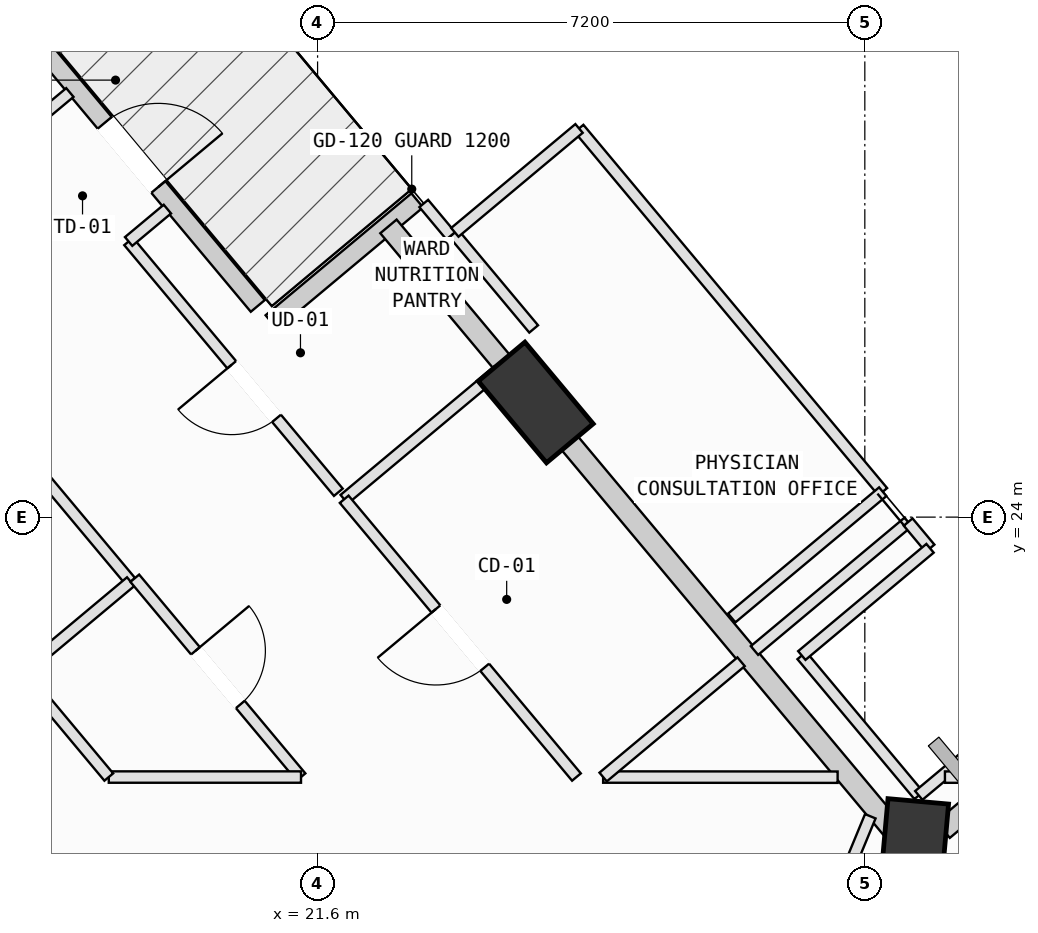
"""IFC4 building model, lengths in metres.
Left out: names, types, materials, properties, quantities, classifications, styles, units other than length and angle.
Written with IfcOpenShell. Run it as: python <this file> out.ifc"""

import sys

from ifc_helpers import new_model, si_unit, direction, frame, frame_2d, origin, origin_2d, place, context, subcontext, project, spatial, rectangle, extrude, element, fill, save


model = new_model("IFC4")
c1 = context("Model", 3, precision=1e-05, world=origin(), true_north=direction((0.0, 1.0)))
c2 = subcontext(c1, "Body", "Model", "MODEL_VIEW")
j1 = project(units=[si_unit("LENGTHUNIT", "METRE"), si_unit("PLANEANGLEUNIT", "RADIAN")], contexts=[c1])
p1 = place(None, origin())
s1 = spatial("IfcSite", under=j1, at=p1, CompositionType="ELEMENT")
p2 = place(p1, origin())
s2 = spatial("IfcBuilding", under=s1, at=p2, CompositionType="ELEMENT")
p3 = place(p2, frame((0.0, 0.0, 193.8)))
s3 = spatial("IfcBuildingStorey", under=s2, at=p3, CompositionType="ELEMENT", Elevation=193.8)
p4 = place(p3, frame((29.441, 19.563, 0.002), z_axis=(0.021801167922, -0.017037887535, 0.999617136441), x_axis=(-0.729765502986, 0.68314184463, 0.027559585755)))
e1 = element("IfcColumn", 1, at=p4, inside=s3, PredefinedType="COLUMN", context=c2, shape_type="SweptSolid", body=[
    extrude(rectangle(XDim=1.4, YDim=0.8, at=origin_2d()), origin(), (0.0, 0.0, 1.0), 3.998),
])
p5 = place(p3, frame((24.47, 25.508, 0.002), z_axis=(-0.00262502539, -0.037849203304, 0.999280014336), x_axis=(-0.586871563846, 0.809156714425, 0.029106340381)))
e2 = element("IfcColumn", 2, at=p5, inside=s3, PredefinedType="COLUMN", context=c2, shape_type="SweptSolid", body=[
    extrude(rectangle(XDim=1.4, YDim=0.8, at=origin_2d()), origin(), (0.0, 0.0, 1.0), 3.999),
])
p6 = place(p3, frame((19.851, 31.032, 0.002), z_axis=(-0.025303350166, -0.057069724712, 0.998049491254), x_axis=(-0.276053399892, 0.959948355604, 0.047892326953)))
e3 = element("IfcColumn", 3, at=p6, inside=s3, PredefinedType="COLUMN", context=c2, shape_type="SweptSolid", body=[
    extrude(rectangle(XDim=1.4, YDim=0.8, at=origin_2d()), origin(), (0.0, 0.0, 1.0), 4.004),
])
p7 = place(p3, frame((16.349, 32.118, 0.0), z_axis=(0.0, 0.0, 1.0), x_axis=(0.64142910076, -0.767182317769, 0.0)))
e4 = element("IfcWall", 4, at=p7, inside=s3, PredefinedType="SOLIDWALL", context=c2, shape_type="SweptSolid", body=[
    extrude(rectangle(XDim=6.96, YDim=0.24, at=frame_2d((3.48, 0.0))), origin(), (0.0, 0.0, 1.0), 3.265),
])
p8 = place(p7, frame((3.82, 0.0, 0.0)))
e5 = element("IfcOpeningElement", 5, at=p8, cuts=e4, PredefinedType="OPENING", context=c2, shape_type="SweptSolid", body=[
    extrude(rectangle(XDim=1.1, YDim=2.15, at=frame_2d((0.55, 1.075))), frame((0.0, 0.13, 0.0), z_axis=(0.0, -1.0, 0.0), x_axis=(1.0, 0.0, 0.0)), (0.0, 0.0, 1.0), 0.26),
])
p9 = place(p3, frame((20.993, 26.564, 0.0), z_axis=(0.0, 0.0, 1.0), x_axis=(0.7671555128, 0.641461159526, 0.0)))
e6 = element("IfcWall", 6, at=p9, inside=s3, PredefinedType="SOLIDWALL", context=c2, shape_type="SweptSolid", body=[
    extrude(rectangle(XDim=2.5, YDim=0.24, at=frame_2d((1.25, 0.0))), origin(), (0.0, 0.0, 1.0), 3.265),
])
p10 = place(p3, frame((29.828, 19.887, 0.0), z_axis=(0.0, 0.0, 1.0), x_axis=(0.767165929265, 0.641448701749, 0.0)))
e7 = element("IfcWall", 7, at=p10, inside=s3, PredefinedType="SOLIDWALL", context=c2, shape_type="SweptSolid", body=[
    extrude(rectangle(XDim=5.96, YDim=0.28, at=frame_2d((2.98, 0.0))), origin(), (0.0, 0.0, 1.0), 3.265),
])
p11 = place(p3, frame((29.158, 19.902, 0.0), z_axis=(0.0, 0.0, 1.0), x_axis=(-0.641469423173, 0.767148603032, 0.0)))
e8 = element("IfcWall", 8, at=p11, inside=s3, PredefinedType="SOLIDWALL", context=c2, shape_type="SweptSolid", body=[
    extrude(rectangle(XDim=6.76, YDim=0.28, at=frame_2d((3.38, 0.0))), origin(), (0.0, 0.0, 1.0), 3.265),
])
p12 = place(p3, frame((24.188, 25.845, 0.0), z_axis=(0.0, 0.0, 1.0), x_axis=(-0.641458055638, 0.767158108122, 0.0)))
e9 = element("IfcWall", 9, at=p12, inside=s3, PredefinedType="SOLIDWALL", context=c2, shape_type="SweptSolid", body=[
    extrude(rectangle(XDim=2.581, YDim=0.28, at=frame_2d((1.291, 0.0))), origin(), (0.0, 0.0, 1.0), 3.245),
])
p13 = place(p3, frame((13.984, 29.319, 0.0), z_axis=(0.0, 0.0, 1.0), x_axis=(0.641434995705, -0.76717738906, 0.0)))
e10 = element("IfcWall", 10, at=p13, inside=s3, PredefinedType="PARTITIONING", context=c2, shape_type="SweptSolid", body=[
    extrude(rectangle(XDim=8.04, YDim=0.15, at=frame_2d((4.02, 0.0))), origin(), (0.0, 0.0, 1.0), 3.78),
])
p14 = place(p13, frame((3.42, 0.0, 0.0)))
e11 = element("IfcOpeningElement", 11, at=p14, cuts=e10, PredefinedType="OPENING", context=c2, shape_type="SweptSolid", body=[
    extrude(rectangle(XDim=1.2, YDim=2.15, at=frame_2d((0.6, 1.075))), frame((0.0, 0.085, 0.0), z_axis=(0.0, -1.0, 0.0), x_axis=(1.0, 0.0, 0.0)), (0.0, 0.0, 1.0), 0.17),
])
p15 = place(p3, frame((19.141, 23.151, 0.0), z_axis=(0.0, 0.0, 1.0), x_axis=(-0.767221821243, -0.64138184961, 0.0)))
e12 = element("IfcWall", 12, at=p15, inside=s3, PredefinedType="PARTITIONING", context=c2, shape_type="SweptSolid", body=[
    extrude(rectangle(XDim=4.008, YDim=0.15, at=frame_2d((2.004, 0.0))), origin(), (0.0, 0.0, 1.0), 3.78),
])
p16 = place(p3, frame((27.971, 22.179, 0.0), z_axis=(0.0, 0.0, 1.0), x_axis=(0.641374499126, -0.767227966038, 0.0)))
e13 = element("IfcWall", 13, at=p16, inside=s3, PredefinedType="PARTITIONING", context=c2, shape_type="SweptSolid", body=[
    extrude(rectangle(XDim=2.4, YDim=0.15, at=frame_2d((1.2, 0.0))), origin(), (0.0, 0.0, 1.0), 3.78),
])
p17 = place(p3, frame((29.51, 20.338, 0.0), z_axis=(0.0, 0.0, 1.0), x_axis=(0.767156772748, 0.641459652688, 0.0)))
e14 = element("IfcWall", 14, at=p17, inside=s3, PredefinedType="PARTITIONING", context=c2, shape_type="SweptSolid", body=[
    extrude(rectangle(XDim=6.944, YDim=0.15, at=frame_2d((3.472, 0.0))), origin(), (0.0, 0.0, 1.0), 3.78),
])
p18 = place(p3, frame((30.478, 20.579, 0.0), z_axis=(0.0, 0.0, 1.0), x_axis=(-1.0, 0.0, 0.0)))
e15 = element("IfcWall", 15, at=p18, inside=s3, PredefinedType="PARTITIONING", context=c2, shape_type="SweptSolid", body=[
    extrude(rectangle(XDim=0.624, YDim=0.15, at=frame_2d((0.312, 0.0))), origin(), (0.0, 0.0, 1.0), 3.78),
])
p19 = place(p3, frame((28.651, 19.529, 0.0), z_axis=(0.0, 0.0, 1.0), x_axis=(0.382128262134, 0.924109296176, 0.0)))
e16 = element("IfcWall", 16, at=p19, inside=s3, PredefinedType="PARTITIONING", context=c2, shape_type="SweptSolid", body=[
    extrude(rectangle(XDim=0.579, YDim=0.15, at=frame_2d((0.29, 0.0))), origin(), (0.0, 0.0, 1.0), 3.78),
])
p20 = place(p3, frame((28.442, 20.578, 0.0), z_axis=(0.0, 0.0, 1.0), x_axis=(-0.99999974635, 0.000712250532, 0.0)))
e17 = element("IfcWall", 17, at=p20, inside=s3, PredefinedType="PARTITIONING", context=c2, shape_type="SweptSolid", body=[
    extrude(rectangle(XDim=3.085, YDim=0.15, at=frame_2d((1.542, 0.0))), origin(), (0.0, 0.0, 1.0), 3.78),
])
p21 = place(p3, frame((25.357, 20.58, 0.0), z_axis=(0.0, 0.0, 1.0), x_axis=(0.767349224347, 0.641229419081, 0.0)))
e18 = element("IfcWall", 18, at=p21, inside=s3, PredefinedType="PARTITIONING", context=c2, shape_type="SweptSolid", body=[
    extrude(rectangle(XDim=2.365, YDim=0.15, at=frame_2d((1.183, 0.0))), origin(), (0.0, 0.0, 1.0), 3.78),
])
p22 = place(p3, frame((27.348, 22.245, 0.0), z_axis=(0.0, 0.0, 1.0), x_axis=(0.76733211285, 0.641249895587, 0.0)))
e19 = element("IfcWall", 19, at=p22, inside=s3, PredefinedType="PARTITIONING", context=c2, shape_type="SweptSolid", body=[
    extrude(rectangle(XDim=2.635, YDim=0.15, at=frame_2d((1.318, 0.0))), origin(), (0.0, 0.0, 1.0), 3.78),
])
p23 = place(p3, frame((29.37, 23.935, 0.0), z_axis=(0.0, 0.0, 1.0), x_axis=(0.640665314314, -0.767820262193, 0.0)))
e20 = element("IfcWall", 20, at=p23, inside=s3, PredefinedType="PARTITIONING", context=c2, shape_type="SweptSolid", body=[
    extrude(rectangle(XDim=0.449, YDim=0.15, at=frame_2d((0.225, 0.0))), origin(), (0.0, 0.0, 1.0), 3.78),
])
p24 = place(p3, frame((29.658, 23.59, 0.0), z_axis=(0.0, 0.0, 1.0), x_axis=(-0.767037139596, -0.641602701428, 0.0)))
e21 = element("IfcWall", 21, at=p24, inside=s3, PredefinedType="PARTITIONING", context=c2, shape_type="SweptSolid", body=[
    extrude(rectangle(XDim=2.199, YDim=0.15, at=frame_2d((1.1, 0.0))), origin(), (0.0, 0.0, 1.0), 3.78),
])
p25 = place(p3, frame((21.95, 24.235, 0.0), z_axis=(0.0, 0.0, 1.0), x_axis=(0.767141544005, 0.641477865137, 0.0)))
e22 = element("IfcWall", 22, at=p25, inside=s3, PredefinedType="PARTITIONING", context=c2, shape_type="SweptSolid", body=[
    extrude(rectangle(XDim=2.635, YDim=0.15, at=frame_2d((1.317, 0.0))), origin(), (0.0, 0.0, 1.0), 3.78),
])
p26 = place(p3, frame((25.006, 20.58, 0.0), z_axis=(0.0, 0.0, 1.0), x_axis=(-0.641458710036, 0.767157560948, 0.0)))
e23 = element("IfcWall", 23, at=p26, inside=s3, PredefinedType="PARTITIONING", context=c2, shape_type="SweptSolid", body=[
    extrude(rectangle(XDim=4.764, YDim=0.15, at=frame_2d((2.382, 0.0))), origin(), (0.0, 0.0, 1.0), 3.415),
])
p27 = place(p26, frame((1.882, 0.0, 0.0)))
e24 = element("IfcOpeningElement", 24, at=p27, cuts=e23, PredefinedType="OPENING", context=c2, shape_type="SweptSolid", body=[
    extrude(rectangle(XDim=1.0, YDim=2.12, at=frame_2d((0.5, 1.06))), frame((0.0, 0.085, 0.0), z_axis=(0.0, -1.0, 0.0), x_axis=(1.0, 0.0, 0.0)), (0.0, 0.0, 1.0), 0.17),
])
p28 = place(p3, frame((23.391, 27.734, 0.0), z_axis=(0.0, 0.0, 1.0), x_axis=(0.641559979039, -0.767072873523, 0.0)))
e25 = element("IfcWall", 25, at=p28, inside=s3, PredefinedType="PARTITIONING", context=c2, shape_type="SweptSolid", body=[
    extrude(rectangle(XDim=1.64, YDim=0.15, at=frame_2d((0.82, 0.0))), origin(), (0.0, 0.0, 1.0), 3.78),
])
p29 = place(p3, frame((21.873, 24.327, 0.0), z_axis=(0.0, 0.0, 1.0), x_axis=(-0.641417353463, 0.767192139347, 0.0)))
e26 = element("IfcWall", 26, at=p29, inside=s3, PredefinedType="PARTITIONING", context=c2, shape_type="SweptSolid", body=[
    extrude(rectangle(XDim=4.302, YDim=0.15, at=frame_2d((2.151, 0.0))), origin(), (0.0, 0.0, 1.0), 3.78),
])
p30 = place(p29, frame((1.268, 0.0, 0.0)))
e27 = element("IfcOpeningElement", 27, at=p30, cuts=e26, PredefinedType="OPENING", context=c2, shape_type="SweptSolid", body=[
    extrude(rectangle(XDim=0.92, YDim=2.1, at=frame_2d((0.46, 1.05))), frame((0.0, 0.085, 0.0), z_axis=(0.0, -1.0, 0.0), x_axis=(1.0, 0.0, 0.0)), (0.0, 0.0, 1.0), 0.17),
])
p31 = place(p3, frame((19.114, 27.627, 0.0), z_axis=(0.0, 0.0, 1.0), x_axis=(0.76746790966, 0.641087363502, 0.0)))
e28 = element("IfcWall", 28, at=p31, inside=s3, PredefinedType="PARTITIONING", context=c2, shape_type="SweptSolid", body=[
    extrude(rectangle(XDim=0.665, YDim=0.15, at=frame_2d((0.332, 0.0))), origin(), (0.0, 0.0, 1.0), 3.78),
])
p32 = place(p3, frame((22.997, 28.127, 0.0), z_axis=(0.0, 0.0, 1.0), x_axis=(0.641007930562, -0.767534255233, 0.0)))
e29 = element("IfcWall", 29, at=p32, inside=s3, PredefinedType="PARTITIONING", context=c2, shape_type="SweptSolid", body=[
    extrude(rectangle(XDim=0.554, YDim=0.15, at=frame_2d((0.277, 0.0))), origin(), (0.0, 0.0, 1.0), 3.78),
])
p33 = place(p3, frame((18.341, 29.587, 0.0), z_axis=(0.0, 0.0, 1.0), x_axis=(-0.76746790966, -0.641087363502, 0.0)))
e30 = element("IfcWall", 30, at=p33, inside=s3, PredefinedType="PARTITIONING", context=c2, shape_type="SweptSolid", body=[
    extrude(rectangle(XDim=0.665, YDim=0.15, at=frame_2d((0.332, 0.0))), origin(), (0.0, 0.0, 1.0), 3.78),
])
p34 = place(p3, frame((19.195, 23.196, 0.0), z_axis=(0.0, 0.0, 1.0), x_axis=(0.641401985735, -0.767204987402, 0.0)))
e31 = element("IfcWall", 31, at=p34, inside=s3, PredefinedType="PARTITIONING", context=c2, shape_type="SweptSolid", body=[
    extrude(rectangle(XDim=3.41, YDim=0.15, at=frame_2d((1.705, 0.0))), origin(), (0.0, 0.0, 1.0), 3.78),
])
p35 = place(p34, frame((1.245, 0.0, 0.0)))
e32 = element("IfcOpeningElement", 32, at=p35, cuts=e31, PredefinedType="OPENING", context=c2, shape_type="SweptSolid", body=[
    extrude(rectangle(XDim=0.92, YDim=2.1, at=frame_2d((0.46, 1.05))), frame((0.0, 0.085, 0.0), z_axis=(0.0, -1.0, 0.0), x_axis=(1.0, 0.0, 0.0)), (0.0, 0.0, 1.0), 0.17),
])
p36 = place(p3, frame((21.382, 20.58, 0.0), z_axis=(0.0, 0.0, 1.0), x_axis=(-1.0, 0.0, 0.0)))
e33 = element("IfcWall", 33, at=p36, inside=s3, PredefinedType="PARTITIONING", context=c2, shape_type="SweptSolid", body=[
    extrude(rectangle(XDim=2.529, YDim=0.15, at=frame_2d((1.265, 0.0))), origin(), (0.0, 0.0, 1.0), 3.78),
])
p37 = place(p3, frame((18.853, 20.58, 0.0), z_axis=(0.0, 0.0, 1.0), x_axis=(-0.641270101846, 0.767315226278, 0.0)))
e34 = element("IfcWall", 34, at=p37, inside=s3, PredefinedType="PARTITIONING", context=c2, shape_type="SweptSolid", body=[
    extrude(rectangle(XDim=1.768, YDim=0.15, at=frame_2d((0.884, 0.0))), origin(), (0.0, 0.0, 1.0), 3.78),
])
p38 = place(p3, frame((25.04, 29.114, 0.0), z_axis=(0.0, 0.0, 1.0), x_axis=(0.641366946807, -0.767234279437, 0.0)))
e35 = element("IfcWall", 35, at=p38, inside=s3, PredefinedType="PARTITIONING", context=c2, shape_type="SweptSolid", body=[
    extrude(rectangle(XDim=6.23, YDim=0.15, at=frame_2d((3.115, 0.0))), origin(), (0.0, 0.0, 1.0), 3.78),
])
p39 = place(p3, frame((29.036, 24.334, 0.0), z_axis=(0.0, 0.0, 1.0), x_axis=(-0.767231220432, -0.641370606119, 0.0)))
e36 = element("IfcWall", 36, at=p39, inside=s3, PredefinedType="PARTITIONING", context=c2, shape_type="SweptSolid", body=[
    extrude(rectangle(XDim=2.59, YDim=0.15, at=frame_2d((1.295, 0.0))), origin(), (0.0, 0.0, 1.0), 3.78),
])
p40 = place(p3, frame((23.406, 27.747, 0.0), z_axis=(0.0, 0.0, 1.0), x_axis=(0.767008164575, 0.641637339527, 0.0)))
e37 = element("IfcWall", 37, at=p40, inside=s3, PredefinedType="PARTITIONING", context=c2, shape_type="SweptSolid", body=[
    extrude(rectangle(XDim=2.13, YDim=0.15, at=frame_2d((1.065, 0.0))), origin(), (0.0, 0.0, 1.0), 3.78),
])
p41 = place(p8, origin())
e38 = element("IfcDoor", 38, at=p41, inside=s3, OperationType="SINGLE_SWING_RIGHT", PredefinedType="DOOR", context=c2, shape_type="SweptSolid", body=[
    extrude(rectangle(XDim=1.1, YDim=2.15, at=frame_2d((0.55, 1.075))), frame((0.0, 0.025, 0.0), z_axis=(0.0, -1.0, 0.0), x_axis=(1.0, 0.0, 0.0)), (0.0, 0.0, 1.0), 0.05),
])
fill(e5, e38)
p42 = place(p27, origin())
e39 = element("IfcDoor", 39, at=p42, inside=s3, OperationType="SINGLE_SWING_RIGHT", PredefinedType="DOOR", context=c2, shape_type="SweptSolid", body=[
    extrude(rectangle(XDim=1.0, YDim=2.12, at=frame_2d((0.5, 1.06))), frame((0.0, 0.025, 0.0), z_axis=(0.0, -1.0, 0.0), x_axis=(1.0, 0.0, 0.0)), (0.0, 0.0, 1.0), 0.05),
])
fill(e24, e39)
p43 = place(p30, origin())
e40 = element("IfcDoor", 40, at=p43, inside=s3, OperationType="SINGLE_SWING_RIGHT", PredefinedType="DOOR", context=c2, shape_type="SweptSolid", body=[
    extrude(rectangle(XDim=0.92, YDim=2.1, at=frame_2d((0.46, 1.05))), frame((0.0, 0.025, 0.0), z_axis=(0.0, -1.0, 0.0), x_axis=(1.0, 0.0, 0.0)), (0.0, 0.0, 1.0), 0.05),
])
fill(e27, e40)
p44 = place(p35, origin())
e41 = element("IfcDoor", 41, at=p44, inside=s3, OperationType="SINGLE_SWING_LEFT", PredefinedType="DOOR", context=c2, shape_type="SweptSolid", body=[
    extrude(rectangle(XDim=0.92, YDim=2.1, at=frame_2d((0.46, 1.05))), frame((0.0, 0.025, 0.0), z_axis=(0.0, -1.0, 0.0), x_axis=(1.0, 0.0, 0.0)), (0.0, 0.0, 1.0), 0.05),
])
fill(e32, e41)
save(model, sys.argv[1])
